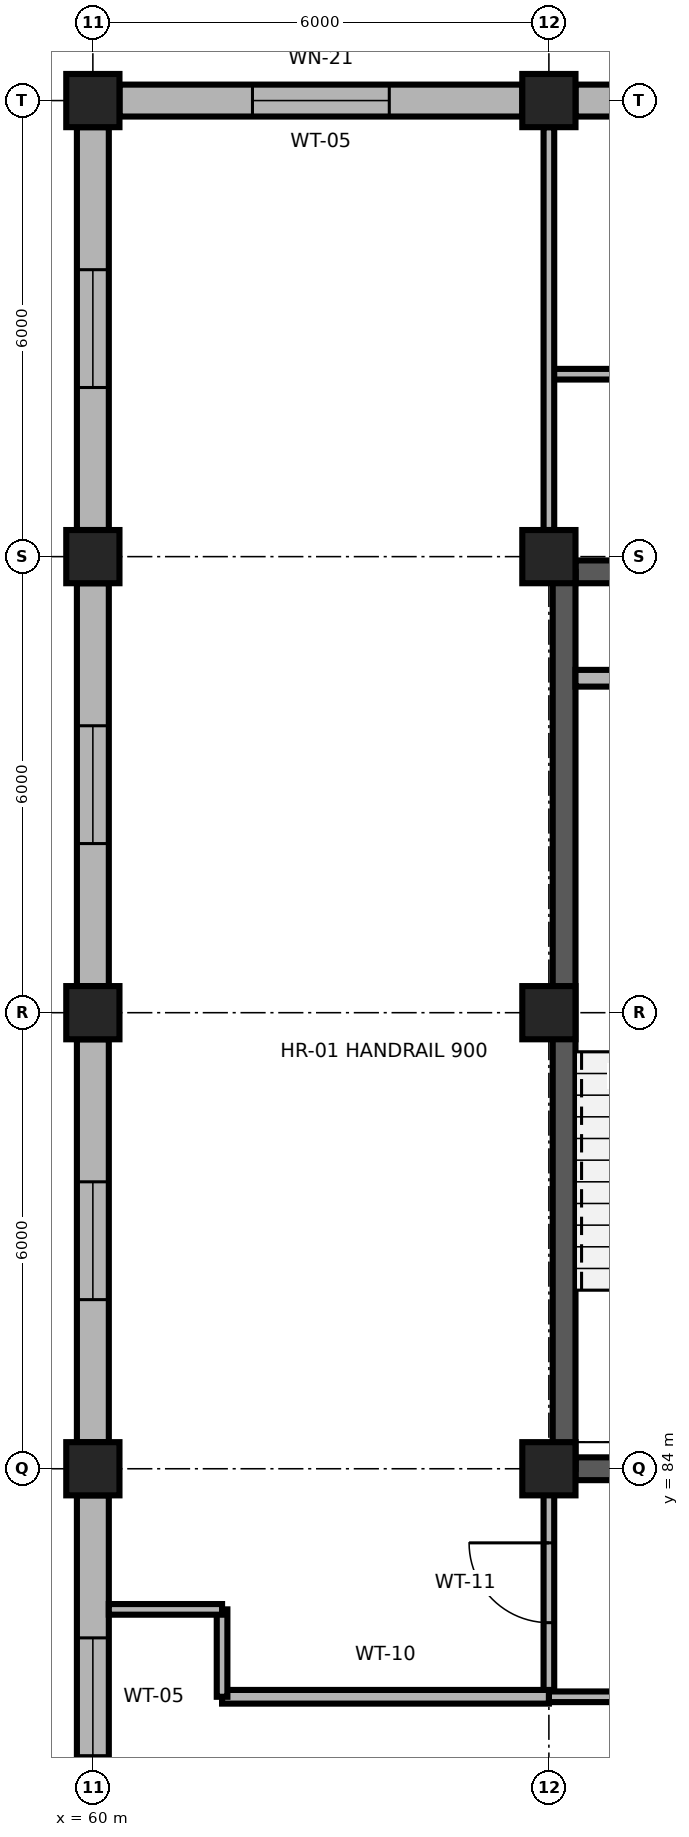
"""IFC4 building model, lengths in metres.
Left out: names, types, materials, properties, quantities, classifications, styles, units other than length and angle.
Written with IfcOpenShell. Run it as: python <this file> out.ifc"""

import sys

from ifc_helpers import new_model, si_unit, direction, frame, frame_2d, origin, origin_2d, place, context, subcontext, project, spatial, rectangle, extrude, element, fill, save


model = new_model("IFC4")
c1 = context("Model", 3, precision=1e-05, world=origin(), true_north=direction((0.0, 1.0)))
c2 = subcontext(c1, "Body", "Model", "MODEL_VIEW")
j1 = project(units=[si_unit("LENGTHUNIT", "METRE"), si_unit("PLANEANGLEUNIT", "RADIAN")], contexts=[c1])
p1 = place(None, origin())
s1 = spatial("IfcSite", under=j1, at=p1, CompositionType="ELEMENT")
p2 = place(p1, origin())
s2 = spatial("IfcBuilding", under=s1, at=p2, CompositionType="ELEMENT")
p3 = place(p2, frame((0.0, 0.0, 63.9)))
s3 = spatial("IfcBuildingStorey", under=s2, at=p3, CompositionType="ELEMENT", Elevation=63.9)
p4 = place(p3, frame((60.0, 84.0, 0.0), z_axis=(0.0, 0.0, 1.0), x_axis=(1.0, 0.0, 0.0)))
e1 = element("IfcColumn", 1, at=p4, inside=s3, PredefinedType="COLUMN", context=c2, shape_type="SweptSolid", body=[
    extrude(rectangle(XDim=0.7, YDim=0.7, at=origin_2d()), origin(), (0.0, 0.0, 1.0), 3.68),
])
p5 = place(p3, frame((66.0, 84.0, 0.0), z_axis=(0.0, 0.0, 1.0), x_axis=(1.0, 0.0, 0.0)))
e2 = element("IfcColumn", 2, at=p5, inside=s3, PredefinedType="COLUMN", context=c2, shape_type="SweptSolid", body=[
    extrude(rectangle(XDim=0.7, YDim=0.7, at=origin_2d()), origin(), (0.0, 0.0, 1.0), 3.9),
])
p6 = place(p3, frame((60.0, 90.0, 0.0), z_axis=(0.0, 0.0, 1.0), x_axis=(1.0, 0.0, 0.0)))
e3 = element("IfcColumn", 3, at=p6, inside=s3, PredefinedType="COLUMN", context=c2, shape_type="SweptSolid", body=[
    extrude(rectangle(XDim=0.7, YDim=0.7, at=origin_2d()), origin(), (0.0, 0.0, 1.0), 3.68),
])
p7 = place(p3, frame((66.0, 90.0, 0.0), z_axis=(0.0, 0.0, 1.0), x_axis=(1.0, 0.0, 0.0)))
e4 = element("IfcColumn", 4, at=p7, inside=s3, PredefinedType="COLUMN", context=c2, shape_type="SweptSolid", body=[
    extrude(rectangle(XDim=0.7, YDim=0.7, at=origin_2d()), origin(), (0.0, 0.0, 1.0), 3.9),
])
p8 = place(p3, frame((60.0, 96.0, 0.0), z_axis=(0.0, 0.0, 1.0), x_axis=(1.0, 0.0, 0.0)))
e5 = element("IfcColumn", 5, at=p8, inside=s3, PredefinedType="COLUMN", context=c2, shape_type="SweptSolid", body=[
    extrude(rectangle(XDim=0.7, YDim=0.7, at=origin_2d()), origin(), (0.0, 0.0, 1.0), 3.68),
])
p9 = place(p3, frame((66.0, 96.0, 0.0), z_axis=(0.0, 0.0, 1.0), x_axis=(1.0, 0.0, 0.0)))
e6 = element("IfcColumn", 6, at=p9, inside=s3, PredefinedType="COLUMN", context=c2, shape_type="SweptSolid", body=[
    extrude(rectangle(XDim=0.7, YDim=0.7, at=origin_2d()), origin(), (0.0, 0.0, 1.0), 3.9),
])
p10 = place(p3, frame((60.0, 102.0, 0.0), z_axis=(0.0, 0.0, 1.0), x_axis=(1.0, 0.0, 0.0)))
e7 = element("IfcColumn", 7, at=p10, inside=s3, PredefinedType="COLUMN", context=c2, shape_type="SweptSolid", body=[
    extrude(rectangle(XDim=0.7, YDim=0.7, at=origin_2d()), origin(), (0.0, 0.0, 1.0), 3.68),
])
p11 = place(p3, frame((66.0, 102.0, 0.0), z_axis=(0.0, 0.0, 1.0), x_axis=(1.0, 0.0, 0.0)))
e8 = element("IfcColumn", 8, at=p11, inside=s3, PredefinedType="COLUMN", context=c2, shape_type="SweptSolid", body=[
    extrude(rectangle(XDim=0.7, YDim=0.7, at=origin_2d()), origin(), (0.0, 0.0, 1.0), 3.9),
])
p12 = place(p3, frame((60.35, 102.0, 0.0), z_axis=(0.0, 0.0, 1.0), x_axis=(1.0, 0.0, 0.0)))
e9 = element("IfcWall", 9, at=p12, inside=s3, PredefinedType="SOLIDWALL", context=c2, shape_type="SweptSolid", body=[
    extrude(rectangle(XDim=5.3, YDim=0.42, at=frame_2d((2.65, 0.0))), origin(), (0.0, 0.0, 1.0), 3.24),
])
p13 = place(p12, frame((1.75, 0.0, 0.85)))
e10 = element("IfcOpeningElement", 10, at=p13, cuts=e9, PredefinedType="OPENING", context=c2, shape_type="SweptSolid", body=[
    extrude(rectangle(XDim=1.8, YDim=1.95, at=frame_2d((0.9, 0.975))), frame((0.0, 0.225, 0.0), z_axis=(0.0, -1.0, 0.0), x_axis=(1.0, 0.0, 0.0)), (0.0, 0.0, 1.0), 0.45),
])
p14 = place(p3, frame((66.35, 102.0, 0.0), z_axis=(0.0, 0.0, 1.0), x_axis=(1.0, 0.0, 0.0)))
e11 = element("IfcWall", 11, at=p14, inside=s3, PredefinedType="SOLIDWALL", context=c2, shape_type="SweptSolid", body=[
    extrude(rectangle(XDim=5.3, YDim=0.42, at=frame_2d((2.65, 0.0))), origin(), (0.0, 0.0, 1.0), 3.24),
])
p15 = place(p14, frame((1.75, 0.0, 0.85)))
e12 = element("IfcOpeningElement", 12, at=p15, cuts=e11, PredefinedType="OPENING", context=c2, shape_type="SweptSolid", body=[
    extrude(rectangle(XDim=1.8, YDim=1.95, at=frame_2d((0.9, 0.975))), frame((0.0, 0.225, 0.0), z_axis=(0.0, -1.0, 0.0), x_axis=(1.0, 0.0, 0.0)), (0.0, 0.0, 1.0), 0.45),
])
p16 = place(p3, frame((60.0, 78.35, 0.0), z_axis=(0.0, 0.0, 1.0), x_axis=(0.0, 1.0, 0.0)))
e13 = element("IfcWall", 13, at=p16, inside=s3, PredefinedType="SOLIDWALL", context=c2, shape_type="SweptSolid", body=[
    extrude(rectangle(XDim=5.3, YDim=0.42, at=frame_2d((2.65, 0.0))), origin(), (0.0, 0.0, 1.0), 3.24),
])
p17 = place(p16, frame((1.875, 0.0, 0.85)))
e14 = element("IfcOpeningElement", 14, at=p17, cuts=e13, PredefinedType="OPENING", context=c2, shape_type="SweptSolid", body=[
    extrude(rectangle(XDim=1.55, YDim=1.9, at=frame_2d((0.775, 0.95))), frame((0.0, 0.225, 0.0), z_axis=(0.0, -1.0, 0.0), x_axis=(1.0, 0.0, 0.0)), (0.0, 0.0, 1.0), 0.45),
])
p18 = place(p3, frame((60.0, 84.35, 0.0), z_axis=(0.0, 0.0, 1.0), x_axis=(0.0, 1.0, 0.0)))
e15 = element("IfcWall", 15, at=p18, inside=s3, PredefinedType="SOLIDWALL", context=c2, shape_type="SweptSolid", body=[
    extrude(rectangle(XDim=5.3, YDim=0.42, at=frame_2d((2.65, 0.0))), origin(), (0.0, 0.0, 1.0), 3.24),
])
p19 = place(p18, frame((1.875, 0.0, 0.85)))
e16 = element("IfcOpeningElement", 16, at=p19, cuts=e15, PredefinedType="OPENING", context=c2, shape_type="SweptSolid", body=[
    extrude(rectangle(XDim=1.55, YDim=1.9, at=frame_2d((0.775, 0.95))), frame((0.0, 0.225, 0.0), z_axis=(0.0, -1.0, 0.0), x_axis=(1.0, 0.0, 0.0)), (0.0, 0.0, 1.0), 0.45),
])
p20 = place(p3, frame((60.0, 90.35, 0.0), z_axis=(0.0, 0.0, 1.0), x_axis=(0.0, 1.0, 0.0)))
e17 = element("IfcWall", 17, at=p20, inside=s3, PredefinedType="SOLIDWALL", context=c2, shape_type="SweptSolid", body=[
    extrude(rectangle(XDim=5.3, YDim=0.42, at=frame_2d((2.65, 0.0))), origin(), (0.0, 0.0, 1.0), 3.24),
])
p21 = place(p20, frame((1.875, 0.0, 0.85)))
e18 = element("IfcOpeningElement", 18, at=p21, cuts=e17, PredefinedType="OPENING", context=c2, shape_type="SweptSolid", body=[
    extrude(rectangle(XDim=1.55, YDim=1.9, at=frame_2d((0.775, 0.95))), frame((0.0, 0.225, 0.0), z_axis=(0.0, -1.0, 0.0), x_axis=(1.0, 0.0, 0.0)), (0.0, 0.0, 1.0), 0.45),
])
p22 = place(p3, frame((60.0, 96.35, 0.0), z_axis=(0.0, 0.0, 1.0), x_axis=(0.0, 1.0, 0.0)))
e19 = element("IfcWall", 19, at=p22, inside=s3, PredefinedType="SOLIDWALL", context=c2, shape_type="SweptSolid", body=[
    extrude(rectangle(XDim=5.3, YDim=0.42, at=frame_2d((2.65, 0.0))), origin(), (0.0, 0.0, 1.0), 3.24),
])
p23 = place(p22, frame((1.875, 0.0, 0.85)))
e20 = element("IfcOpeningElement", 20, at=p23, cuts=e19, PredefinedType="OPENING", context=c2, shape_type="SweptSolid", body=[
    extrude(rectangle(XDim=1.55, YDim=1.9, at=frame_2d((0.775, 0.95))), frame((0.0, 0.225, 0.0), z_axis=(0.0, -1.0, 0.0), x_axis=(1.0, 0.0, 0.0)), (0.0, 0.0, 1.0), 0.45),
])
p24 = place(p3, frame((66.35, 84.0, 0.0), z_axis=(0.0, 0.0, 1.0), x_axis=(1.0, 0.0, 0.0)))
e21 = element("IfcWall", 21, at=p24, inside=s3, PredefinedType="SHEAR", context=c2, shape_type="SweptSolid", body=[
    extrude(rectangle(XDim=5.3, YDim=0.3, at=frame_2d((2.65, 0.0))), origin(), (0.0, 0.0, 1.0), 3.66),
])
p25 = place(p24, frame((1.975, 0.0, 0.0)))
e22 = element("IfcOpeningElement", 22, at=p25, cuts=e21, PredefinedType="OPENING", context=c2, shape_type="SweptSolid", body=[
    extrude(rectangle(XDim=1.35, YDim=2.2, at=frame_2d((0.675, 1.1))), frame((0.0, 0.165, 0.0), z_axis=(0.0, -1.0, 0.0), x_axis=(1.0, 0.0, 0.0)), (0.0, 0.0, 1.0), 0.33),
])
p26 = place(p3, frame((66.35, 95.8, 0.0), z_axis=(0.0, 0.0, 1.0), x_axis=(1.0, 0.0, 0.0)))
e23 = element("IfcWall", 23, at=p26, inside=s3, PredefinedType="SHEAR", context=c2, shape_type="SweptSolid", body=[
    extrude(rectangle(XDim=5.3, YDim=0.3, at=frame_2d((2.65, 0.0))), origin(), (0.0, 0.0, 1.0), 3.66),
])
p27 = place(p3, frame((66.2, 84.0, 0.0), z_axis=(0.0, 0.0, 1.0), x_axis=(0.0, 1.0, 0.0)))
e24 = element("IfcWall", 24, at=p27, inside=s3, PredefinedType="SHEAR", context=c2, shape_type="SweptSolid", body=[
    extrude(rectangle(XDim=11.8, YDim=0.3, at=frame_2d((5.9, 0.0))), origin(), (0.0, 0.0, 1.0), 3.66),
])
p28 = place(p3, frame((66.35, 94.4, 0.0), z_axis=(0.0, 0.0, 1.0), x_axis=(1.0, 0.0, 0.0)))
e25 = element("IfcWall", 25, at=p28, inside=s3, PredefinedType="PARTITIONING", context=c2, shape_type="SweptSolid", body=[
    extrude(rectangle(XDim=1.1, YDim=0.22, at=frame_2d((0.55, 0.0))), origin(), (0.0, 0.0, 1.0), 3.66),
])
p29 = place(p3, frame((66.0, 81.05, 0.0), z_axis=(0.0, 0.0, 1.0), x_axis=(0.0, 1.0, 0.0)))
e26 = element("IfcWall", 26, at=p29, inside=s3, PredefinedType="PARTITIONING", context=c2, shape_type="SweptSolid", body=[
    extrude(rectangle(XDim=2.9, YDim=0.14, at=frame_2d((1.45, 0.0))), origin(), (0.0, 0.0, 1.0), 3.369),
])
p30 = place(p29, frame((0.925, 0.0, 0.0)))
e27 = element("IfcOpeningElement", 27, at=p30, cuts=e26, PredefinedType="OPENING", context=c2, shape_type="SweptSolid", body=[
    extrude(rectangle(XDim=1.05, YDim=2.25, at=frame_2d((0.525, 1.125))), frame((0.0, 0.085, 0.0), z_axis=(0.0, -1.0, 0.0), x_axis=(1.0, 0.0, 0.0)), (0.0, 0.0, 1.0), 0.17),
])
p31 = place(p3, frame((66.0, 81.0, 0.0), z_axis=(0.0, 0.0, 1.0), x_axis=(1.0, 0.0, 0.0)))
e28 = element("IfcWall", 28, at=p31, inside=s3, PredefinedType="PARTITIONING", context=c2, shape_type="SweptSolid", body=[
    extrude(rectangle(XDim=6.0, YDim=0.14, at=frame_2d((3.0, 0.0))), origin(), (0.0, 0.0, 1.0), 3.66),
])
p32 = place(p31, frame((2.475, 0.0, 0.0)))
e29 = element("IfcOpeningElement", 29, at=p32, cuts=e28, PredefinedType="OPENING", context=c2, shape_type="SweptSolid", body=[
    extrude(rectangle(XDim=1.05, YDim=2.25, at=frame_2d((0.525, 1.125))), frame((0.0, 0.085, 0.0), z_axis=(0.0, -1.0, 0.0), x_axis=(1.0, 0.0, 0.0)), (0.0, 0.0, 1.0), 0.17),
])
p33 = place(p3, frame((66.0, 98.4, 0.0), z_axis=(0.0, 0.0, 1.0), x_axis=(1.0, 0.0, 0.0)))
e30 = element("IfcWall", 30, at=p33, inside=s3, PredefinedType="PARTITIONING", context=c2, shape_type="SweptSolid", body=[
    extrude(rectangle(XDim=6.0, YDim=0.14, at=frame_2d((3.0, 0.0))), origin(), (0.0, 0.0, 1.0), 3.66),
])
p34 = place(p33, frame((2.54, 0.0, 0.0)))
e31 = element("IfcOpeningElement", 31, at=p34, cuts=e30, PredefinedType="OPENING", context=c2, shape_type="SweptSolid", body=[
    extrude(rectangle(XDim=0.92, YDim=2.15, at=frame_2d((0.46, 1.075))), frame((0.0, 0.085, 0.0), z_axis=(0.0, -1.0, 0.0), x_axis=(1.0, 0.0, 0.0)), (0.0, 0.0, 1.0), 0.17),
])
p35 = place(p3, frame((61.7, 81.0, 0.0), z_axis=(0.0, 0.0, 1.0), x_axis=(1.0, 0.0, 0.0)))
e32 = element("IfcWall", 32, at=p35, inside=s3, PredefinedType="PARTITIONING", context=c2, shape_type="SweptSolid", body=[
    extrude(rectangle(XDim=4.3, YDim=0.18, at=frame_2d((2.15, 0.0))), origin(), (0.0, 0.0, 1.0), 3.66),
])
p36 = place(p3, frame((61.7, 81.0, 0.0), z_axis=(0.0, 0.0, 1.0), x_axis=(0.0, 1.0, 0.0)))
e33 = element("IfcWall", 33, at=p36, inside=s3, PredefinedType="PARTITIONING", context=c2, shape_type="SweptSolid", body=[
    extrude(rectangle(XDim=1.15, YDim=0.14, at=frame_2d((0.575, 0.0))), origin(), (0.0, 0.0, 1.0), 3.66),
])
p37 = place(p3, frame((61.7, 82.15, 0.0), z_axis=(0.0, 0.0, 1.0), x_axis=(-1.0, 0.0, 0.0)))
e34 = element("IfcWall", 34, at=p37, inside=s3, PredefinedType="PARTITIONING", context=c2, shape_type="SweptSolid", body=[
    extrude(rectangle(XDim=1.49, YDim=0.14, at=frame_2d((0.745, 0.0))), origin(), (0.0, 0.0, 1.0), 3.66),
])
p38 = place(p3, frame((66.0, 96.35, 0.0), z_axis=(0.0, 0.0, 1.0), x_axis=(0.0, 1.0, 0.0)))
e35 = element("IfcWall", 35, at=p38, inside=s3, PredefinedType="PARTITIONING", context=c2, shape_type="SweptSolid", body=[
    extrude(rectangle(XDim=5.3, YDim=0.14, at=frame_2d((2.65, 0.0))), origin(), (0.0, 0.0, 1.0), 3.369),
])
p39 = place(p13, origin())
e36 = element("IfcWindow", 36, at=p39, inside=s3, PartitioningType="SINGLE_PANEL", PredefinedType="WINDOW", context=c2, shape_type="SweptSolid", body=[
    extrude(rectangle(XDim=1.8, YDim=1.95, at=frame_2d((0.9, 0.975))), frame((0.0, 0.03, 0.0), z_axis=(0.0, -1.0, 0.0), x_axis=(1.0, 0.0, 0.0)), (0.0, 0.0, 1.0), 0.06),
])
fill(e10, e36)
p40 = place(p17, origin())
e37 = element("IfcWindow", 37, at=p40, inside=s3, PartitioningType="SINGLE_PANEL", PredefinedType="WINDOW", context=c2, shape_type="SweptSolid", body=[
    extrude(rectangle(XDim=1.55, YDim=1.9, at=frame_2d((0.775, 0.95))), frame((0.0, 0.03, 0.0), z_axis=(0.0, -1.0, 0.0), x_axis=(1.0, 0.0, 0.0)), (0.0, 0.0, 1.0), 0.06),
])
fill(e14, e37)
p41 = place(p19, origin())
e38 = element("IfcWindow", 38, at=p41, inside=s3, PartitioningType="SINGLE_PANEL", PredefinedType="WINDOW", context=c2, shape_type="SweptSolid", body=[
    extrude(rectangle(XDim=1.55, YDim=1.9, at=frame_2d((0.775, 0.95))), frame((0.0, 0.03, 0.0), z_axis=(0.0, -1.0, 0.0), x_axis=(1.0, 0.0, 0.0)), (0.0, 0.0, 1.0), 0.06),
])
fill(e16, e38)
p42 = place(p21, origin())
e39 = element("IfcWindow", 39, at=p42, inside=s3, PartitioningType="SINGLE_PANEL", PredefinedType="WINDOW", context=c2, shape_type="SweptSolid", body=[
    extrude(rectangle(XDim=1.55, YDim=1.9, at=frame_2d((0.775, 0.95))), frame((0.0, 0.03, 0.0), z_axis=(0.0, -1.0, 0.0), x_axis=(1.0, 0.0, 0.0)), (0.0, 0.0, 1.0), 0.06),
])
fill(e18, e39)
p43 = place(p23, origin())
e40 = element("IfcWindow", 40, at=p43, inside=s3, PartitioningType="SINGLE_PANEL", PredefinedType="WINDOW", context=c2, shape_type="SweptSolid", body=[
    extrude(rectangle(XDim=1.55, YDim=1.9, at=frame_2d((0.775, 0.95))), frame((0.0, 0.03, 0.0), z_axis=(0.0, -1.0, 0.0), x_axis=(1.0, 0.0, 0.0)), (0.0, 0.0, 1.0), 0.06),
])
fill(e20, e40)
p44 = place(p30, origin())
e41 = element("IfcDoor", 41, at=p44, inside=s3, OperationType="SINGLE_SWING_RIGHT", PredefinedType="DOOR", context=c2, shape_type="SweptSolid", body=[
    extrude(rectangle(XDim=1.05, YDim=2.25, at=frame_2d((0.525, 1.125))), frame((0.0, 0.025, 0.0), z_axis=(0.0, -1.0, 0.0), x_axis=(1.0, 0.0, 0.0)), (0.0, 0.0, 1.0), 0.05),
])
fill(e27, e41)
save(model, sys.argv[1])
